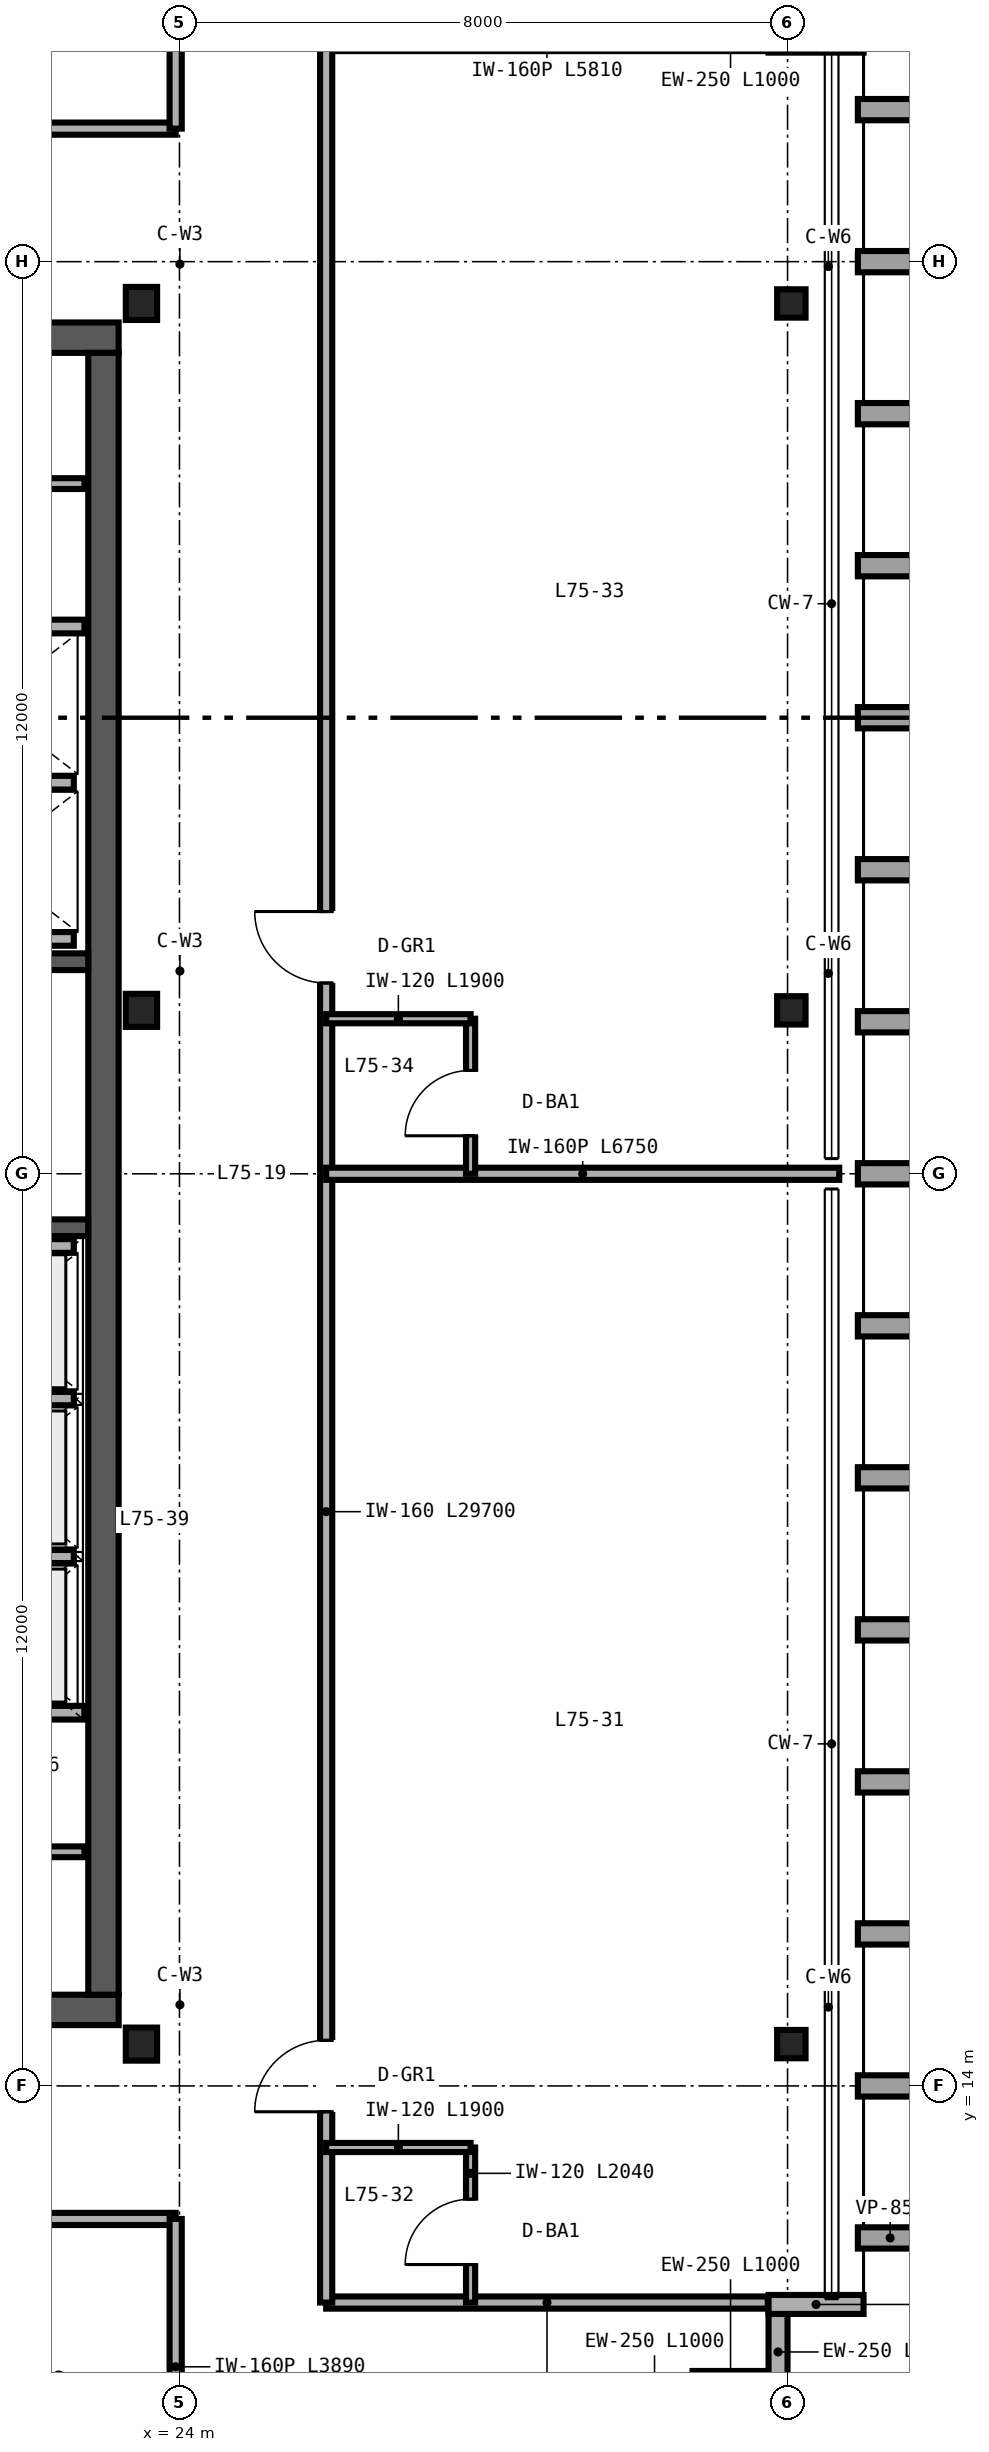
"""IFC4 building model, lengths in metres.
Left out: names, types, materials, properties, quantities, classifications, styles, units other than length and angle.
Written with IfcOpenShell. Run it as: python <this file> out.ifc"""

import sys

from ifc_helpers import new_model, si_unit, direction, frame, frame_2d, origin, origin_2d, place, context, subcontext, project, spatial, rectangle, i_section, extrude, source, transform, mapped, element, fill, save


model = new_model("IFC4")
c1 = context("Model", 3, precision=1e-05, world=origin(), true_north=direction((0.0, 1.0)))
c2 = subcontext(c1, "Body", "Model", "MODEL_VIEW")
j1 = project(units=[si_unit("LENGTHUNIT", "METRE"), si_unit("PLANEANGLEUNIT", "RADIAN")], contexts=[c1])
p1 = place(None, origin())
s1 = spatial("IfcSite", under=j1, at=p1, CompositionType="ELEMENT")
p2 = place(p1, origin())
s2 = spatial("IfcBuilding", under=s1, at=p2, CompositionType="ELEMENT")
p3 = place(p2, frame((0.0, 0.0, 294.0)))
s3 = spatial("IfcBuildingStorey", under=s2, at=p3, CompositionType="ELEMENT", Elevation=294.0)
p4 = place(p3, frame((10.8, 15.0, 0.0), z_axis=(0.0, 0.0, 1.0), x_axis=(1.0, 0.0, 0.0)))
e1 = element("IfcWall", 1, at=p4, inside=s3, PredefinedType="SHEAR", context=c2, shape_type="SweptSolid", body=[
    extrude(rectangle(XDim=12.4, YDim=0.4, at=frame_2d((6.2, 0.0))), origin(), (0.0, 0.0, 1.0), 3.38),
])
p5 = place(p4, frame((10.1, 0.0, 0.0)))
e2 = element("IfcOpeningElement", 2, at=p5, cuts=e1, PredefinedType="OPENING", context=c2, shape_type="SweptSolid", body=[
    extrude(rectangle(XDim=1.0, YDim=2.15, at=frame_2d((0.5, 1.075))), frame((0.0, 0.21, 0.0), z_axis=(0.0, -1.0, 0.0), x_axis=(1.0, 0.0, 0.0)), (0.0, 0.0, 1.0), 0.42),
])
p6 = place(p3, frame((10.8, 37.0, 0.0), z_axis=(0.0, 0.0, 1.0), x_axis=(1.0, 0.0, 0.0)))
e3 = element("IfcWall", 3, at=p6, inside=s3, PredefinedType="SHEAR", context=c2, shape_type="SweptSolid", body=[
    extrude(rectangle(XDim=12.4, YDim=0.4, at=frame_2d((6.2, 0.0))), origin(), (0.0, 0.0, 1.0), 3.38),
])
p7 = place(p6, frame((10.3, 0.0, 0.0)))
e4 = element("IfcOpeningElement", 4, at=p7, cuts=e3, PredefinedType="OPENING", context=c2, shape_type="SweptSolid", body=[
    extrude(rectangle(XDim=1.0, YDim=2.15, at=frame_2d((0.5, 1.075))), frame((0.0, 0.21, 0.0), z_axis=(0.0, -1.0, 0.0), x_axis=(1.0, 0.0, 0.0)), (0.0, 0.0, 1.0), 0.42),
])
p8 = place(p3, frame((23.0, 15.2, 0.0), z_axis=(0.0, 0.0, 1.0), x_axis=(0.0, 1.0, 0.0)))
e5 = element("IfcWall", 5, at=p8, inside=s3, PredefinedType="SHEAR", context=c2, shape_type="SweptSolid", body=[
    extrude(rectangle(XDim=21.6, YDim=0.4, at=frame_2d((10.8, 0.0))), origin(), (0.0, 0.0, 1.0), 3.38),
])
p9 = place(p3, frame((14.18, 25.29, 0.0), z_axis=(0.0, 0.0, 1.0), x_axis=(1.0, 0.0, 0.0)))
e6 = element("IfcWall", 6, at=p9, inside=s3, PredefinedType="SHEAR", context=c2, shape_type="SweptSolid", body=[
    extrude(rectangle(XDim=8.62, YDim=0.22, at=frame_2d((4.31, 0.0))), origin(), (0.0, 0.0, 1.0), 3.4),
])
p10 = place(p9, frame((0.47, 0.0, 0.0)))
e7 = element("IfcOpeningElement", 7, at=p10, cuts=e6, PredefinedType="OPENING", context=c2, shape_type="SweptSolid", body=[
    extrude(rectangle(XDim=1.05, YDim=2.15, at=frame_2d((0.525, 1.075))), frame((0.0, 0.12, 0.0), z_axis=(0.0, -1.0, 0.0), x_axis=(1.0, 0.0, 0.0)), (0.0, 0.0, 1.0), 0.24),
])
p11 = place(p3, frame((14.18, 28.79, 0.0), z_axis=(0.0, 0.0, 1.0), x_axis=(1.0, 0.0, 0.0)))
e8 = element("IfcWall", 8, at=p11, inside=s3, PredefinedType="SHEAR", context=c2, shape_type="SweptSolid", body=[
    extrude(rectangle(XDim=8.62, YDim=0.22, at=frame_2d((4.31, 0.0))), origin(), (0.0, 0.0, 1.0), 3.4),
])
m1 = source(origin(), c2, "Body", "SweptSolid", [
    extrude(i_section(OverallWidth=0.412, OverallDepth=0.435, WebThickness=0.036, FlangeThickness=0.057, FilletRadius=0.025, at=origin_2d()), origin(), (0.0, 0.0, 1.0), 3.38),
])
for number, where, z_axis, x_axis in (
    (9, (23.5, 14.55, 0.0), (0.0, 0.0, 1.0), (1.0, 0.0, 0.0)),
    (10, (23.5, 28.15, 0.0), (0.0, 0.0, 1.0), (1.0, 0.0, 0.0)),
    (11, (23.5, 37.45, 0.0), (0.0, 0.0, 1.0), (1.0, 0.0, 0.0)),
):
    element("IfcColumn", number, at=place(p3, frame(where, z_axis=z_axis, x_axis=x_axis)), inside=s3, PredefinedType="COLUMN", context=c2, shape_type="MappedRepresentation", body=[
        mapped(m1, transform((0.0, 0.0, 0.0), scale=1.0)),
    ])
m2 = source(origin(), c2, "Body", "SweptSolid", [
    extrude(i_section(OverallWidth=0.374, OverallDepth=0.373, WebThickness=0.016, FlangeThickness=0.026, FilletRadius=0.025, at=origin_2d()), origin(), (0.0, 0.0, 1.0), 3.38),
])
for number, where, z_axis, x_axis in (
    (12, (32.05, 14.55, 0.0), (0.0, 0.0, 1.0), (1.0, 0.0, 0.0)),
    (13, (32.05, 28.15, 0.0), (0.0, 0.0, 1.0), (1.0, 0.0, 0.0)),
    (14, (32.05, 37.45, 0.0), (0.0, 0.0, 1.0), (1.0, 0.0, 0.0)),
):
    element("IfcColumn", number, at=place(p3, frame(where, z_axis=z_axis, x_axis=x_axis)), inside=s3, PredefinedType="COLUMN", context=c2, shape_type="MappedRepresentation", body=[
        mapped(m2, transform((0.0, 0.0, 0.0), scale=1.0)),
    ])
for number, where, z_axis, x_axis in (
    (15, (30.75, 10.125, 0.0), (0.0, 0.0, 1.0), (1.0, 0.0, 0.0)),
    (16, (31.875, 10.0, 0.0), (0.0, 0.0, 1.0), (0.0, 1.0, 0.0)),
):
    element("IfcWall", number, at=place(p3, frame(where, z_axis=z_axis, x_axis=x_axis)), inside=s3, PredefinedType="SOLIDWALL", context=c2, shape_type="SweptSolid", body=[
        extrude(rectangle(XDim=1.0, YDim=0.25, at=frame_2d((0.5, 0.0))), origin(), (0.0, 0.0, 1.0), 3.38),
    ])
p12 = place(p3, frame((31.75, 11.125, 0.0), z_axis=(0.0, 0.0, 1.0), x_axis=(1.0, 0.0, 0.0)))
e17 = element("IfcWall", 17, at=p12, inside=s3, PredefinedType="SOLIDWALL", context=c2, shape_type="SweptSolid", body=[
    extrude(rectangle(XDim=1.25, YDim=0.25, at=frame_2d((0.625, 0.0))), origin(), (0.0, 0.0, 1.0), 3.38),
])
p13 = place(p3, frame((20.12, 18.91, 0.0), z_axis=(0.0, 0.0, 1.0), x_axis=(1.0, 0.0, 0.0)))
e18 = element("IfcWall", 18, at=p13, inside=s3, PredefinedType="SOLIDWALL", context=c2, shape_type="SweptSolid", body=[
    extrude(rectangle(XDim=2.63, YDim=0.18, at=frame_2d((1.315, 0.0))), origin(), (0.0, 0.0, 1.0), 3.38),
])
p14 = place(p3, frame((20.25, 25.05, 0.0), z_axis=(0.0, 0.0, 1.0), x_axis=(1.0, 0.0, 0.0)))
e19 = element("IfcWall", 19, at=p14, inside=s3, PredefinedType="SOLIDWALL", context=c2, shape_type="SweptSolid", body=[
    extrude(rectangle(XDim=2.36, YDim=0.18, at=frame_2d((1.18, 0.0))), origin(), (0.0, 0.0, 1.0), 3.38),
])
p15 = place(p3, frame((20.25, 20.965, 0.0), z_axis=(0.0, 0.0, 1.0), x_axis=(1.0, 0.0, 0.0)))
e20 = element("IfcWall", 20, at=p15, inside=s3, PredefinedType="SOLIDWALL", context=c2, shape_type="SweptSolid", body=[
    extrude(rectangle(XDim=2.36, YDim=0.18, at=frame_2d((1.18, 0.0))), origin(), (0.0, 0.0, 1.0), 2.48),
])
for number, where, z_axis, x_axis in (
    (21, (20.25, 23.045, 0.0), (0.0, 0.0, 1.0), (1.0, 0.0, 0.0)),
    (22, (20.25, 29.09, 0.0), (0.0, 0.0, 1.0), (1.0, 0.0, 0.0)),
):
    element("IfcWall", number, at=place(p3, frame(where, z_axis=z_axis, x_axis=x_axis)), inside=s3, PredefinedType="SOLIDWALL", context=c2, shape_type="SweptSolid", body=[
        extrude(rectangle(XDim=2.36, YDim=0.18, at=frame_2d((1.18, 0.0))), origin(), (0.0, 0.0, 1.0), 3.38),
    ])
p16 = place(p3, frame((20.25, 33.2, 0.0), z_axis=(0.0, 0.0, 1.0), x_axis=(1.0, 0.0, 0.0)))
e23 = element("IfcWall", 23, at=p16, inside=s3, PredefinedType="SOLIDWALL", context=c2, shape_type="SweptSolid", body=[
    extrude(rectangle(XDim=2.5, YDim=0.18, at=frame_2d((1.25, 0.0))), origin(), (0.0, 0.0, 1.0), 3.38),
])
p17 = place(p3, frame((20.25, 31.145, 0.0), z_axis=(0.0, 0.0, 1.0), x_axis=(1.0, 0.0, 0.0)))
e24 = element("IfcWall", 24, at=p17, inside=s3, PredefinedType="SOLIDWALL", context=c2, shape_type="SweptSolid", body=[
    extrude(rectangle(XDim=2.36, YDim=0.18, at=frame_2d((1.18, 0.0))), origin(), (0.0, 0.0, 1.0), 3.38),
])
p18 = place(p3, frame((20.12, 17.08, 0.0), z_axis=(0.0, 0.0, 1.0), x_axis=(1.0, 0.0, 0.0)))
e25 = element("IfcWall", 25, at=p18, inside=s3, PredefinedType="PARTITIONING", context=c2, shape_type="SweptSolid", body=[
    extrude(rectangle(XDim=2.63, YDim=0.142, at=frame_2d((1.315, 0.0))), origin(), (0.0, 0.0, 1.0), 3.38),
])
p19 = place(p18, frame((0.85, 0.0, 0.0)))
e26 = element("IfcOpeningElement", 26, at=p19, cuts=e25, PredefinedType="OPENING", context=c2, shape_type="SweptSolid", body=[
    extrude(rectangle(XDim=0.84, YDim=2.1, at=frame_2d((0.42, 1.05))), frame((0.0, 0.081, 0.0), z_axis=(0.0, -1.0, 0.0), x_axis=(1.0, 0.0, 0.0)), (0.0, 0.0, 1.0), 0.162),
])
p20 = place(p3, frame((20.12, 35.08, 0.0), z_axis=(0.0, 0.0, 1.0), x_axis=(1.0, 0.0, 0.0)))
e27 = element("IfcWall", 27, at=p20, inside=s3, PredefinedType="PARTITIONING", context=c2, shape_type="SweptSolid", body=[
    extrude(rectangle(XDim=2.63, YDim=0.142, at=frame_2d((1.315, 0.0))), origin(), (0.0, 0.0, 1.0), 3.38),
])
p21 = place(p20, frame((0.85, 0.0, 0.0)))
e28 = element("IfcOpeningElement", 28, at=p21, cuts=e27, PredefinedType="OPENING", context=c2, shape_type="SweptSolid", body=[
    extrude(rectangle(XDim=0.84, YDim=2.1, at=frame_2d((0.42, 1.05))), frame((0.0, 0.081, 0.0), z_axis=(0.0, -1.0, 0.0), x_axis=(1.0, 0.0, 0.0)), (0.0, 0.0, 1.0), 0.162),
])
p22 = place(p3, frame((11.2, 12.25, 0.0), z_axis=(0.0, 0.0, 1.0), x_axis=(1.0, 0.0, 0.0)))
e29 = element("IfcWall", 29, at=p22, inside=s3, PredefinedType="PARTITIONING", context=c2, shape_type="SweptSolid", body=[
    extrude(rectangle(XDim=12.75, YDim=0.16, at=frame_2d((6.375, 0.0))), origin(), (0.0, 0.0, 1.0), 3.38),
])
p23 = place(p22, frame((2.72, 0.0, 0.0)))
e30 = element("IfcOpeningElement", 30, at=p23, cuts=e29, PredefinedType="OPENING", context=c2, shape_type="SweptSolid", body=[
    extrude(rectangle(XDim=0.96, YDim=2.15, at=frame_2d((0.48, 1.075))), frame((0.0, 0.09, 0.0), z_axis=(0.0, -1.0, 0.0), x_axis=(1.0, 0.0, 0.0)), (0.0, 0.0, 1.0), 0.18),
])
p24 = place(p22, frame((9.095, 0.0, 0.0)))
e31 = element("IfcOpeningElement", 31, at=p24, cuts=e29, PredefinedType="OPENING", context=c2, shape_type="SweptSolid", body=[
    extrude(rectangle(XDim=0.96, YDim=2.15, at=frame_2d((0.48, 1.075))), frame((0.0, 0.09, 0.0), z_axis=(0.0, -1.0, 0.0), x_axis=(1.0, 0.0, 0.0)), (0.0, 0.0, 1.0), 0.18),
])
p25 = place(p3, frame((23.95, 8.36, 0.0), z_axis=(0.0, 0.0, 1.0), x_axis=(0.0, 1.0, 0.0)))
e32 = element("IfcWall", 32, at=p25, inside=s3, PredefinedType="PARTITIONING", context=c2, shape_type="SweptSolid", body=[
    extrude(rectangle(XDim=3.89, YDim=0.16, at=frame_2d((1.945, 0.0))), origin(), (0.0, 0.0, 1.0), 3.38),
])
p26 = place(p3, frame((11.2, 39.75, 0.0), z_axis=(0.0, 0.0, 1.0), x_axis=(1.0, 0.0, 0.0)))
e33 = element("IfcWall", 33, at=p26, inside=s3, PredefinedType="PARTITIONING", context=c2, shape_type="SweptSolid", body=[
    extrude(rectangle(XDim=12.75, YDim=0.16, at=frame_2d((6.375, 0.0))), origin(), (0.0, 0.0, 1.0), 3.38),
])
p27 = place(p26, frame((2.72, 0.0, 0.0)))
e34 = element("IfcOpeningElement", 34, at=p27, cuts=e33, PredefinedType="OPENING", context=c2, shape_type="SweptSolid", body=[
    extrude(rectangle(XDim=0.96, YDim=2.15, at=frame_2d((0.48, 1.075))), frame((0.0, 0.09, 0.0), z_axis=(0.0, -1.0, 0.0), x_axis=(1.0, 0.0, 0.0)), (0.0, 0.0, 1.0), 0.18),
])
p28 = place(p26, frame((9.095, 0.0, 0.0)))
e35 = element("IfcOpeningElement", 35, at=p28, cuts=e33, PredefinedType="OPENING", context=c2, shape_type="SweptSolid", body=[
    extrude(rectangle(XDim=0.96, YDim=2.15, at=frame_2d((0.48, 1.075))), frame((0.0, 0.09, 0.0), z_axis=(0.0, -1.0, 0.0), x_axis=(1.0, 0.0, 0.0)), (0.0, 0.0, 1.0), 0.18),
])
p29 = place(p3, frame((23.95, 39.75, 0.0), z_axis=(0.0, 0.0, 1.0), x_axis=(0.0, 1.0, 0.0)))
e36 = element("IfcWall", 36, at=p29, inside=s3, PredefinedType="PARTITIONING", context=c2, shape_type="SweptSolid", body=[
    extrude(rectangle(XDim=3.89, YDim=0.16, at=frame_2d((1.945, 0.0))), origin(), (0.0, 0.0, 1.0), 3.38),
])
p30 = place(p3, frame((25.93, 11.15, 0.0), z_axis=(0.0, 0.0, 1.0), x_axis=(1.0, 0.0, 0.0)))
e37 = element("IfcWall", 37, at=p30, inside=s3, PredefinedType="PARTITIONING", context=c2, shape_type="SweptSolid", body=[
    extrude(rectangle(XDim=5.81, YDim=0.16, at=frame_2d((2.905, 0.0))), origin(), (0.0, 0.0, 1.0), 3.38),
])
p31 = place(p3, frame((25.93, 11.15, 0.0), z_axis=(0.0, 0.0, 1.0), x_axis=(0.0, 1.0, 0.0)))
e38 = element("IfcWall", 38, at=p31, inside=s3, PredefinedType="PARTITIONING", context=c2, shape_type="SweptSolid", body=[
    extrude(rectangle(XDim=29.7, YDim=0.16, at=frame_2d((14.85, 0.0))), origin(), (0.0, 0.0, 1.0), 2.524),
])
p32 = place(p31, frame((2.51, 0.0, 0.0)))
e39 = element("IfcOpeningElement", 39, at=p32, cuts=e38, PredefinedType="OPENING", context=c2, shape_type="SweptSolid", body=[
    extrude(rectangle(XDim=0.94, YDim=2.15, at=frame_2d((0.47, 1.075))), frame((0.0, 0.09, 0.0), z_axis=(0.0, -1.0, 0.0), x_axis=(1.0, 0.0, 0.0)), (0.0, 0.0, 1.0), 0.18),
])
p33 = place(p31, frame((17.36, 0.0, 0.0)))
e40 = element("IfcOpeningElement", 40, at=p33, cuts=e38, PredefinedType="OPENING", context=c2, shape_type="SweptSolid", body=[
    extrude(rectangle(XDim=0.94, YDim=2.15, at=frame_2d((0.47, 1.075))), frame((0.0, 0.09, 0.0), z_axis=(0.0, -1.0, 0.0), x_axis=(1.0, 0.0, 0.0)), (0.0, 0.0, 1.0), 0.18),
])
p34 = place(p3, frame((25.93, 26.0, 0.0), z_axis=(0.0, 0.0, 1.0), x_axis=(1.0, 0.0, 0.0)))
e41 = element("IfcWall", 41, at=p34, inside=s3, PredefinedType="PARTITIONING", context=c2, shape_type="SweptSolid", body=[
    extrude(rectangle(XDim=6.75, YDim=0.16, at=frame_2d((3.375, 0.0))), origin(), (0.0, 0.0, 1.0), 2.601),
])
p35 = place(p3, frame((27.83, 11.15, 0.0), z_axis=(0.0, 0.0, 1.0), x_axis=(0.0, 1.0, 0.0)))
e42 = element("IfcWall", 42, at=p35, inside=s3, PredefinedType="PARTITIONING", context=c2, shape_type="SweptSolid", body=[
    extrude(rectangle(XDim=2.04, YDim=0.12, at=frame_2d((1.02, 0.0))), origin(), (0.0, 0.0, 1.0), 3.38),
])
p36 = place(p35, frame((0.5, 0.0, 0.0)))
e43 = element("IfcOpeningElement", 43, at=p36, cuts=e42, PredefinedType="OPENING", context=c2, shape_type="SweptSolid", body=[
    extrude(rectangle(XDim=0.86, YDim=2.1, at=frame_2d((0.43, 1.05))), frame((0.0, 0.07, 0.0), z_axis=(0.0, -1.0, 0.0), x_axis=(1.0, 0.0, 0.0)), (0.0, 0.0, 1.0), 0.14),
])
p37 = place(p3, frame((25.93, 13.19, 0.0), z_axis=(0.0, 0.0, 1.0), x_axis=(1.0, 0.0, 0.0)))
e44 = element("IfcWall", 44, at=p37, inside=s3, PredefinedType="PARTITIONING", context=c2, shape_type="SweptSolid", body=[
    extrude(rectangle(XDim=1.9, YDim=0.12, at=frame_2d((0.95, 0.0))), origin(), (0.0, 0.0, 1.0), 3.38),
])
p38 = place(p3, frame((27.83, 26.0, 0.0), z_axis=(0.0, 0.0, 1.0), x_axis=(0.0, 1.0, 0.0)))
e45 = element("IfcWall", 45, at=p38, inside=s3, PredefinedType="PARTITIONING", context=c2, shape_type="SweptSolid", body=[
    extrude(rectangle(XDim=2.04, YDim=0.12, at=frame_2d((1.02, 0.0))), origin(), (0.0, 0.0, 1.0), 2.524),
])
p39 = place(p38, frame((0.5, 0.0, 0.0)))
e46 = element("IfcOpeningElement", 46, at=p39, cuts=e45, PredefinedType="OPENING", context=c2, shape_type="SweptSolid", body=[
    extrude(rectangle(XDim=0.86, YDim=2.1, at=frame_2d((0.43, 1.05))), frame((0.0, 0.07, 0.0), z_axis=(0.0, -1.0, 0.0), x_axis=(1.0, 0.0, 0.0)), (0.0, 0.0, 1.0), 0.14),
])
p40 = place(p3, frame((25.93, 28.04, 0.0), z_axis=(0.0, 0.0, 1.0), x_axis=(1.0, 0.0, 0.0)))
e47 = element("IfcWall", 47, at=p40, inside=s3, PredefinedType="PARTITIONING", context=c2, shape_type="SweptSolid", body=[
    extrude(rectangle(XDim=1.9, YDim=0.12, at=frame_2d((0.95, 0.0))), origin(), (0.0, 0.0, 1.0), 2.524),
])
m3 = source(origin(), c2, "Body", "SweptSolid", [
    extrude(rectangle(XDim=0.86, YDim=2.1, at=frame_2d((0.43, 1.05))), frame((0.0, 0.025, 0.0), z_axis=(0.0, -1.0, 0.0), x_axis=(1.0, 0.0, 0.0)), (0.0, 0.0, 1.0), 0.05),
])
p41 = place(p36, origin())
e48 = element("IfcDoor", 48, at=p41, inside=s3, OperationType="SINGLE_SWING_LEFT", PredefinedType="DOOR", context=c2, shape_type="MappedRepresentation", body=[
    mapped(m3, transform((0.0, 0.0, 0.0), scale=1.0)),
])
fill(e43, e48)
m4 = source(origin(), c2, "Body", "SweptSolid", [
    extrude(rectangle(XDim=0.94, YDim=2.15, at=frame_2d((0.47, 1.075))), frame((0.0, 0.025, 0.0), z_axis=(0.0, -1.0, 0.0), x_axis=(1.0, 0.0, 0.0)), (0.0, 0.0, 1.0), 0.05),
])
p42 = place(p32, origin())
e49 = element("IfcDoor", 49, at=p42, inside=s3, OperationType="SINGLE_SWING_LEFT", PredefinedType="DOOR", context=c2, shape_type="MappedRepresentation", body=[
    mapped(m4, transform((0.0, 0.0, 0.0), scale=1.0)),
])
fill(e39, e49)
p43 = place(p39, origin())
e50 = element("IfcDoor", 50, at=p43, inside=s3, OperationType="SINGLE_SWING_LEFT", PredefinedType="DOOR", context=c2, shape_type="MappedRepresentation", body=[
    mapped(m3, transform((0.0, 0.0, 0.0), scale=1.0)),
])
fill(e46, e50)
p44 = place(p33, origin())
e51 = element("IfcDoor", 51, at=p44, inside=s3, OperationType="SINGLE_SWING_RIGHT", PredefinedType="DOOR", context=c2, shape_type="MappedRepresentation", body=[
    mapped(m4, transform((0.0, 0.0, 0.0), scale=1.0)),
])
fill(e40, e51)
save(model, sys.argv[1])
